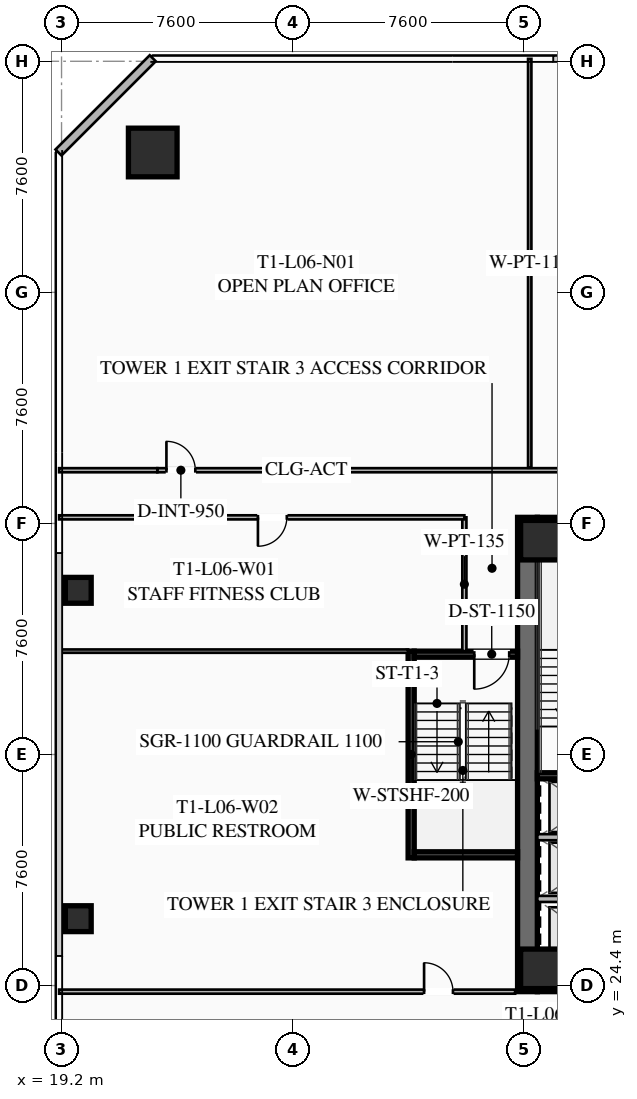
"""IFC4 building model, lengths in metres.
Left out: names, types, materials, properties, quantities, classifications, styles, units other than length and angle.
Written with IfcOpenShell. Run it as: python <this file> out.ifc"""

import sys

from ifc_helpers import new_model, si_unit, direction, frame, frame_2d, origin, origin_2d, place, context, subcontext, project, spatial, rectangle, hollow_rectangle, extrude, element, fill, save


model = new_model("IFC4")
c1 = context("Model", 3, precision=1e-05, world=origin(), true_north=direction((0.0, 1.0)))
c2 = subcontext(c1, "Body", "Model", "MODEL_VIEW")
j1 = project(units=[si_unit("LENGTHUNIT", "METRE"), si_unit("PLANEANGLEUNIT", "RADIAN")], contexts=[c1])
p1 = place(None, origin())
s1 = spatial("IfcSite", under=j1, at=p1, CompositionType="ELEMENT")
p2 = place(p1, origin())
s2 = spatial("IfcBuilding", under=s1, at=p2, CompositionType="ELEMENT")
p3 = place(p2, frame((0.0, 0.0, 28.15)))
s3 = spatial("IfcBuildingStorey", under=s2, at=p3, CompositionType="ELEMENT", Elevation=28.15)
p4 = place(p3, frame((34.525, 24.2, 0.0), z_axis=(0.0, 0.0, 1.0), x_axis=(0.0, 1.0, 0.0)))
e1 = element("IfcWall", 1, at=p4, inside=s3, PredefinedType="SHEAR", context=c2, shape_type="SweptSolid", body=[
    extrude(rectangle(XDim=15.6, YDim=0.65, at=frame_2d((7.8, 0.0))), origin(), (0.0, 0.0, 1.0), 3.55),
])
p5 = place(p3, frame((49.15, 24.525, 0.0), z_axis=(0.0, 0.0, 1.0), x_axis=(-1.0, 0.0, 0.0)))
e2 = element("IfcWall", 2, at=p5, inside=s3, PredefinedType="SHEAR", context=c2, shape_type="SweptSolid", body=[
    extrude(rectangle(XDim=14.3, YDim=0.65, at=frame_2d((7.15, 0.0))), origin(), (0.0, 0.0, 1.0), 3.55),
])
p6 = place(p5, frame((8.85, 0.0, 0.0)))
e3 = element("IfcOpeningElement", 3, at=p6, cuts=e2, PredefinedType="OPENING", context=c2, shape_type="SweptSolid", body=[
    extrude(rectangle(XDim=1.25, YDim=2.25, at=frame_2d((0.625, 1.125))), frame((0.0, 0.335, 0.0), z_axis=(0.0, -1.0, 0.0), x_axis=(1.0, 0.0, 0.0)), (0.0, 0.0, 1.0), 0.67),
])
p7 = place(p5, frame((3.8, 0.0, 0.0)))
e4 = element("IfcOpeningElement", 4, at=p7, cuts=e2, PredefinedType="OPENING", context=c2, shape_type="SweptSolid", body=[
    extrude(rectangle(XDim=1.25, YDim=2.25, at=frame_2d((0.625, 1.125))), frame((0.0, 0.335, 0.0), z_axis=(0.0, -1.0, 0.0), x_axis=(1.0, 0.0, 0.0)), (0.0, 0.0, 1.0), 0.67),
])
p8 = place(p3, frame((34.85, 39.475, 0.0), z_axis=(0.0, 0.0, 1.0), x_axis=(1.0, 0.0, 0.0)))
e5 = element("IfcWall", 5, at=p8, inside=s3, PredefinedType="SHEAR", context=c2, shape_type="SweptSolid", body=[
    extrude(rectangle(XDim=14.3, YDim=0.65, at=frame_2d((7.15, 0.0))), origin(), (0.0, 0.0, 1.0), 3.55),
])
p9 = place(p8, frame((4.2, 0.0, 0.0)))
e6 = element("IfcOpeningElement", 6, at=p9, cuts=e5, PredefinedType="OPENING", context=c2, shape_type="SweptSolid", body=[
    extrude(rectangle(XDim=1.25, YDim=2.25, at=frame_2d((0.625, 1.125))), frame((0.0, 0.335, 0.0), z_axis=(0.0, -1.0, 0.0), x_axis=(1.0, 0.0, 0.0)), (0.0, 0.0, 1.0), 0.67),
])
p10 = place(p8, frame((9.25, 0.0, 0.0)))
e7 = element("IfcOpeningElement", 7, at=p10, cuts=e5, PredefinedType="OPENING", context=c2, shape_type="SweptSolid", body=[
    extrude(rectangle(XDim=1.25, YDim=2.25, at=frame_2d((0.625, 1.125))), frame((0.0, 0.335, 0.0), z_axis=(0.0, -1.0, 0.0), x_axis=(1.0, 0.0, 0.0)), (0.0, 0.0, 1.0), 0.67),
])
for number, where, z_axis, x_axis in (
    (8, (34.95, 24.95, 0.0), (0.0, 0.0, 1.0), (1.0, 0.0, 0.0)),
    (9, (34.95, 39.05, 0.0), (0.0, 0.0, 1.0), (1.0, 0.0, 0.0)),
):
    element("IfcColumn", number, at=place(p3, frame(where, z_axis=z_axis, x_axis=x_axis)), inside=s3, PredefinedType="COLUMN", context=c2, shape_type="SweptSolid", body=[
        extrude(hollow_rectangle(XDim=1.3, YDim=1.3, WallThickness=0.05, at=origin_2d()), origin(), (0.0, 0.0, 1.0), 3.35),
    ])
p11 = place(p3, frame((22.2, 51.8, 0.0), z_axis=(0.0, 0.0, 1.0), x_axis=(1.0, 0.0, 0.0)))
e10 = element("IfcColumn", 10, at=p11, inside=s3, PredefinedType="COLUMN", context=c2, shape_type="SweptSolid", body=[
    extrude(hollow_rectangle(XDim=1.6, YDim=1.6, WallThickness=0.06, at=origin_2d()), origin(), (0.0, 0.0, 1.0), 3.35),
])
for number, where, z_axis, x_axis in (
    (11, (19.75, 37.4, 0.0), (0.0, 0.0, 1.0), (1.0, 0.0, 0.0)),
    (12, (19.75, 26.6, 0.0), (0.0, 0.0, 1.0), (1.0, 0.0, 0.0)),
):
    element("IfcColumn", number, at=place(p3, frame(where, z_axis=z_axis, x_axis=x_axis)), inside=s3, PredefinedType="COLUMN", context=c2, shape_type="SweptSolid", body=[
        extrude(hollow_rectangle(XDim=0.85, YDim=0.85, WallThickness=0.035, at=origin_2d()), origin(), (0.0, 0.0, 1.0), 3.35),
    ])
p12 = place(p3, frame((19.1, 51.8, 0.0), z_axis=(0.0, 0.0, 1.0), x_axis=(0.707106781187, 0.707106781187, 0.0)))
e13 = element("IfcWall", 13, at=p12, inside=s3, PredefinedType="SOLIDWALL", context=c2, shape_type="SweptSolid", body=[
    extrude(rectangle(XDim=4.384, YDim=0.28, at=frame_2d((2.192, 0.0))), origin(), (0.0, 0.0, 1.0), 3.35),
])
for number, where, z_axis, x_axis in (
    (14, (34.85, 31.3, 0.0), (0.0, 0.0, 1.0), (1.0, 0.0, 0.0)),
    (15, (34.85, 38.7, 0.0), (0.0, 0.0, 1.0), (1.0, 0.0, 0.0)),
):
    element("IfcWall", number, at=place(p3, frame(where, z_axis=z_axis, x_axis=x_axis)), inside=s3, PredefinedType="SHEAR", context=c2, shape_type="SweptSolid", body=[
        extrude(rectangle(XDim=3.45, YDim=0.2, at=frame_2d((1.725, 0.0))), origin(), (0.0, 0.0, 1.0), 3.35),
    ])
for number, where, z_axis, x_axis in (
    (16, (34.85, 27.25, 0.0), (0.0, 0.0, 1.0), (1.0, 0.0, 0.0)),
    (17, (34.85, 29.28, 0.0), (0.0, 0.0, 1.0), (1.0, 0.0, 0.0)),
):
    element("IfcWall", number, at=place(p3, frame(where, z_axis=z_axis, x_axis=x_axis)), inside=s3, PredefinedType="SOLIDWALL", context=c2, shape_type="SweptSolid", body=[
        extrude(rectangle(XDim=3.1, YDim=0.2, at=frame_2d((1.55, 0.0))), origin(), (0.0, 0.0, 1.0), 3.35),
    ])
p13 = place(p3, frame((30.7, 28.6, 0.0), z_axis=(0.0, 0.0, 1.0), x_axis=(0.0, 1.0, 0.0)))
e18 = element("IfcWall", 18, at=p13, inside=s3, PredefinedType="SHEAR", context=c2, shape_type="SweptSolid", body=[
    extrude(rectangle(XDim=6.8, YDim=0.2, at=frame_2d((3.4, 0.0))), origin(), (0.0, 0.0, 1.0), 3.35),
])
p14 = place(p3, frame((34.2, 35.3, 0.0), z_axis=(0.0, 0.0, 1.0), x_axis=(-1.0, 0.0, 0.0)))
e19 = element("IfcWall", 19, at=p14, inside=s3, PredefinedType="SHEAR", context=c2, shape_type="SweptSolid", body=[
    extrude(rectangle(XDim=3.4, YDim=0.2, at=frame_2d((1.7, 0.0))), origin(), (0.0, 0.0, 1.0), 3.35),
])
p15 = place(p14, frame((0.275, 0.0, 0.0)))
e20 = element("IfcOpeningElement", 20, at=p15, cuts=e19, PredefinedType="OPENING", context=c2, shape_type="SweptSolid", body=[
    extrude(rectangle(XDim=1.15, YDim=2.2, at=frame_2d((0.575, 1.1))), frame((0.0, 0.11, 0.0), z_axis=(0.0, -1.0, 0.0), x_axis=(1.0, 0.0, 0.0)), (0.0, 0.0, 1.0), 0.22),
])
p16 = place(p3, frame((30.8, 28.7, 0.0), z_axis=(0.0, 0.0, 1.0), x_axis=(1.0, 0.0, 0.0)))
e21 = element("IfcWall", 21, at=p16, inside=s3, PredefinedType="SHEAR", context=c2, shape_type="SweptSolid", body=[
    extrude(rectangle(XDim=3.4, YDim=0.2, at=frame_2d((1.7, 0.0))), origin(), (0.0, 0.0, 1.0), 3.35),
])
p17 = place(p3, frame((32.45, 35.4, 0.0), z_axis=(0.0, 0.0, 1.0), x_axis=(0.0, 1.0, 0.0)))
e22 = element("IfcWall", 22, at=p17, inside=s3, PredefinedType="PARTITIONING", context=c2, shape_type="SweptSolid", body=[
    extrude(rectangle(XDim=4.4, YDim=0.135, at=frame_2d((2.2, 0.0))), origin(), (0.0, 0.0, 1.0), 2.703),
])
p18 = place(p3, frame((22.35, 41.35, 0.0), z_axis=(0.0, 0.0, 1.0), x_axis=(1.0, 0.0, 0.0)))
e23 = element("IfcWall", 23, at=p18, inside=s3, PredefinedType="PARTITIONING", context=c2, shape_type="SweptSolid", body=[
    extrude(rectangle(XDim=29.0, YDim=0.135, at=frame_2d((14.5, 0.0))), origin(), (0.0, 0.0, 1.0), 2.703),
])
p19 = place(p18, frame((0.3, 0.0, 0.0)))
e24 = element("IfcOpeningElement", 24, at=p19, cuts=e23, PredefinedType="OPENING", context=c2, shape_type="SweptSolid", body=[
    extrude(rectangle(XDim=0.95, YDim=2.05, at=frame_2d((0.475, 1.025))), frame((0.0, 0.077, 0.0), z_axis=(0.0, -1.0, 0.0), x_axis=(1.0, 0.0, 0.0)), (0.0, 0.0, 1.0), 0.155),
])
p20 = place(p18, frame((19.299, 0.0, 0.0)))
e25 = element("IfcOpeningElement", 25, at=p20, cuts=e23, PredefinedType="OPENING", context=c2, shape_type="SweptSolid", body=[
    extrude(rectangle(XDim=0.95, YDim=2.05, at=frame_2d((0.475, 1.025))), frame((0.0, 0.077, 0.0), z_axis=(0.0, -1.0, 0.0), x_axis=(1.0, 0.0, 0.0)), (0.0, 0.0, 1.0), 0.155),
])
p21 = place(p18, frame((27.75, 0.0, 0.0)))
e26 = element("IfcOpeningElement", 26, at=p21, cuts=e23, PredefinedType="OPENING", context=c2, shape_type="SweptSolid", body=[
    extrude(rectangle(XDim=0.95, YDim=2.05, at=frame_2d((0.475, 1.025))), frame((0.0, 0.077, 0.0), z_axis=(0.0, -1.0, 0.0), x_axis=(1.0, 0.0, 0.0)), (0.0, 0.0, 1.0), 0.155),
])
p22 = place(p3, frame((19.12, 41.35, 0.0), z_axis=(0.0, 0.0, 1.0), x_axis=(1.0, 0.0, 0.0)))
e27 = element("IfcWall", 27, at=p22, inside=s3, PredefinedType="PARTITIONING", context=c2, shape_type="SweptSolid", body=[
    extrude(rectangle(XDim=3.23, YDim=0.135, at=frame_2d((1.615, 0.0))), origin(), (0.0, 0.0, 1.0), 2.703),
])
p23 = place(p3, frame((34.6, 41.43, 0.0), z_axis=(0.0, 0.0, 1.0), x_axis=(0.0, 1.0, 0.0)))
e28 = element("IfcWall", 28, at=p23, inside=s3, PredefinedType="PARTITIONING", context=c2, shape_type="SweptSolid", body=[
    extrude(rectangle(XDim=13.45, YDim=0.11, at=frame_2d((6.725, 0.0))), origin(), (0.0, 0.0, 1.0), 2.703),
])
p24 = place(p3, frame((32.45, 39.8, 0.0), z_axis=(0.0, 0.0, 1.0), x_axis=(-1.0, 0.0, 0.0)))
e29 = element("IfcWall", 29, at=p24, inside=s3, PredefinedType="PARTITIONING", context=c2, shape_type="SweptSolid", body=[
    extrude(rectangle(XDim=13.33, YDim=0.135, at=frame_2d((6.665, 0.0))), origin(), (0.0, 0.0, 1.0), 2.703),
])
p25 = place(p24, frame((5.84, 0.0, 0.0)))
e30 = element("IfcOpeningElement", 30, at=p25, cuts=e29, PredefinedType="OPENING", context=c2, shape_type="SweptSolid", body=[
    extrude(rectangle(XDim=0.95, YDim=2.05, at=frame_2d((0.475, 1.025))), frame((0.0, 0.077, 0.0), z_axis=(0.0, -1.0, 0.0), x_axis=(1.0, 0.0, 0.0)), (0.0, 0.0, 1.0), 0.155),
])
p26 = place(p3, frame((19.12, 24.2, 0.0), z_axis=(0.0, 0.0, 1.0), x_axis=(1.0, 0.0, 0.0)))
e31 = element("IfcWall", 31, at=p26, inside=s3, PredefinedType="PARTITIONING", context=c2, shape_type="SweptSolid", body=[
    extrude(rectangle(XDim=15.0, YDim=0.135, at=frame_2d((7.5, 0.0))), origin(), (0.0, 0.0, 1.0), 2.703),
])
p27 = place(p26, frame((12.005, 0.0, 0.0)))
e32 = element("IfcOpeningElement", 32, at=p27, cuts=e31, PredefinedType="OPENING", context=c2, shape_type="SweptSolid", body=[
    extrude(rectangle(XDim=0.95, YDim=2.05, at=frame_2d((0.475, 1.025))), frame((0.0, 0.077, 0.0), z_axis=(0.0, -1.0, 0.0), x_axis=(1.0, 0.0, 0.0)), (0.0, 0.0, 1.0), 0.155),
])
p28 = place(p3, frame((30.6, 35.4, 0.0), z_axis=(0.0, 0.0, 1.0), x_axis=(-1.0, 0.0, 0.0)))
e33 = element("IfcWall", 33, at=p28, inside=s3, PredefinedType="PARTITIONING", context=c2, shape_type="SweptSolid", body=[
    extrude(rectangle(XDim=11.48, YDim=0.11, at=frame_2d((5.74, 0.0))), origin(), (0.0, 0.0, 1.0), 2.703),
])
p29 = place(p15, origin())
e34 = element("IfcDoor", 34, at=p29, inside=s3, OperationType="SINGLE_SWING_RIGHT", PredefinedType="DOOR", context=c2, shape_type="SweptSolid", body=[
    extrude(rectangle(XDim=1.15, YDim=2.2, at=frame_2d((0.575, 1.1))), frame((0.0, 0.025, 0.0), z_axis=(0.0, -1.0, 0.0), x_axis=(1.0, 0.0, 0.0)), (0.0, 0.0, 1.0), 0.05),
])
fill(e20, e34)
p30 = place(p19, origin())
e35 = element("IfcDoor", 35, at=p30, inside=s3, OperationType="SINGLE_SWING_LEFT", PredefinedType="DOOR", context=c2, shape_type="SweptSolid", body=[
    extrude(rectangle(XDim=0.95, YDim=2.05, at=frame_2d((0.475, 1.025))), frame((0.0, 0.025, 0.0), z_axis=(0.0, -1.0, 0.0), x_axis=(1.0, 0.0, 0.0)), (0.0, 0.0, 1.0), 0.05),
])
fill(e24, e35)
p31 = place(p25, origin())
e36 = element("IfcDoor", 36, at=p31, inside=s3, OperationType="SINGLE_SWING_RIGHT", PredefinedType="DOOR", context=c2, shape_type="SweptSolid", body=[
    extrude(rectangle(XDim=0.95, YDim=2.05, at=frame_2d((0.475, 1.025))), frame((0.0, 0.025, 0.0), z_axis=(0.0, -1.0, 0.0), x_axis=(1.0, 0.0, 0.0)), (0.0, 0.0, 1.0), 0.05),
])
fill(e30, e36)
p32 = place(p27, origin())
e37 = element("IfcDoor", 37, at=p32, inside=s3, OperationType="SINGLE_SWING_LEFT", PredefinedType="DOOR", context=c2, shape_type="SweptSolid", body=[
    extrude(rectangle(XDim=0.95, YDim=2.05, at=frame_2d((0.475, 1.025))), frame((0.0, 0.025, 0.0), z_axis=(0.0, -1.0, 0.0), x_axis=(1.0, 0.0, 0.0)), (0.0, 0.0, 1.0), 0.05),
])
fill(e32, e37)
save(model, sys.argv[1])
